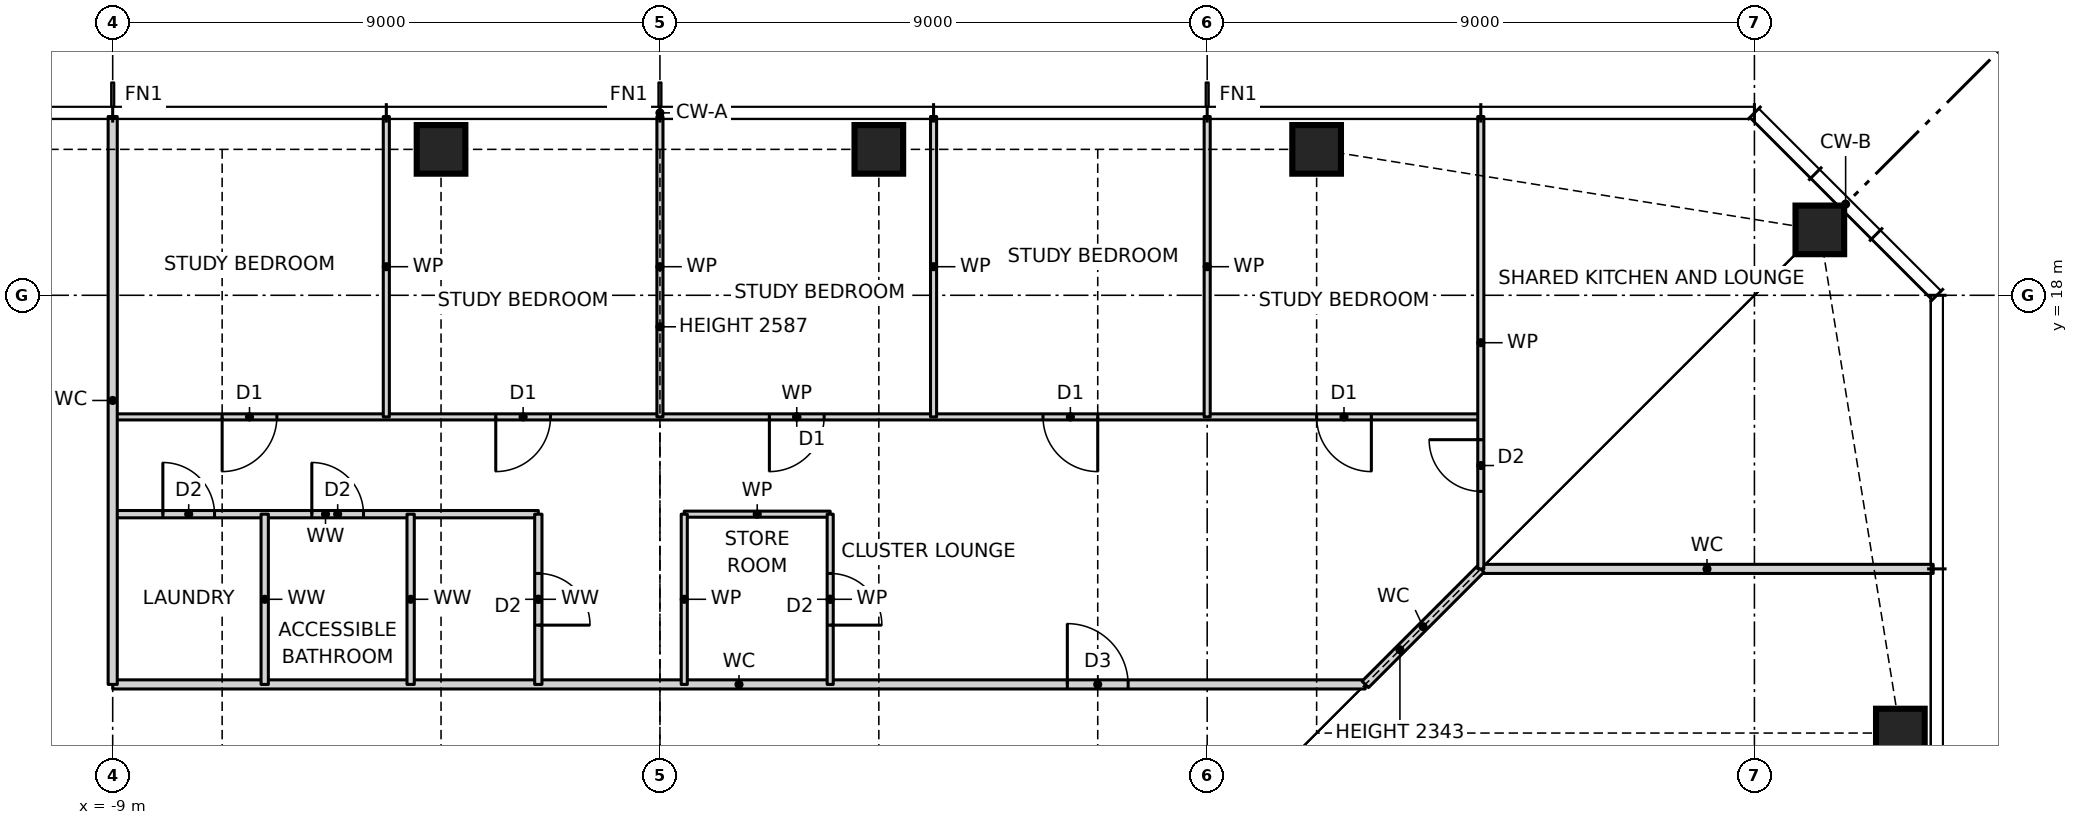
"""IFC4 building model, lengths in metres.
Left out: names, types, materials, properties, quantities, classifications, styles, units other than length and angle.
Written with IfcOpenShell. Run it as: python <this file> out.ifc"""

import sys

from ifc_helpers import new_model, si_unit, direction, frame, frame_2d, origin, origin_2d, place, context, subcontext, project, spatial, rectangle, hollow_rectangle, extrude, element, fill, save


model = new_model("IFC4")
c1 = context("Model", 3, precision=1e-05, world=origin(), true_north=direction((0.0, 1.0)))
c2 = subcontext(c1, "Body", "Model", "MODEL_VIEW")
j1 = project(units=[si_unit("LENGTHUNIT", "METRE"), si_unit("PLANEANGLEUNIT", "RADIAN")], contexts=[c1])
p1 = place(None, origin())
s1 = spatial("IfcSite", under=j1, at=p1, CompositionType="ELEMENT")
p2 = place(p1, origin())
s2 = spatial("IfcBuilding", under=s1, at=p2, CompositionType="ELEMENT")
p3 = place(p2, frame((0.0, 0.0, 87.5)))
s3 = spatial("IfcBuildingStorey", under=s2, at=p3, CompositionType="ELEMENT", Elevation=87.5)
for number, where, z_axis, x_axis in (
    (1, (20.4, 10.8, 0.0), (0.0, 0.0, 1.0), (1.0, 0.0, 0.0)),
    (2, (19.076, 19.076, 0.0), (0.0, 0.0, 1.0), (1.0, 0.0, 0.0)),
    (3, (10.8, 20.4, 0.0), (0.0, 0.0, 1.0), (1.0, 0.0, 0.0)),
    (4, (3.6, 20.4, 0.0), (0.0, 0.0, 1.0), (1.0, 0.0, 0.0)),
    (5, (-3.6, 20.4, 0.0), (0.0, 0.0, 1.0), (1.0, 0.0, 0.0)),
):
    element("IfcColumn", number, at=place(p3, frame(where, z_axis=z_axis, x_axis=x_axis)), inside=s3, PredefinedType="COLUMN", context=c2, shape_type="SweptSolid", body=[
        extrude(hollow_rectangle(XDim=0.8, YDim=0.8, WallThickness=0.07, at=origin_2d()), origin(), (0.0, 0.0, 1.0), 3.5),
    ])
p4 = place(p3, frame((-9.0, 11.6, 0.0), z_axis=(0.0, 0.0, 1.0), x_axis=(1.0, 0.0, 0.0)))
e6 = element("IfcWall", 6, at=p4, inside=s3, PredefinedType="PARTITIONING", context=c2, shape_type="SweptSolid", body=[
    extrude(rectangle(XDim=20.6, YDim=0.15, at=frame_2d((10.3, 0.0))), origin(), (0.0, 0.0, 1.0), 3.27),
])
p5 = place(p4, frame((15.7, 0.0, 0.0)))
e7 = element("IfcOpeningElement", 7, at=p5, cuts=e6, PredefinedType="OPENING", context=c2, shape_type="SweptSolid", body=[
    extrude(rectangle(XDim=1.0, YDim=2.1, at=frame_2d((0.5, 1.05))), frame((0.0, 0.085, 0.0), z_axis=(0.0, -1.0, 0.0), x_axis=(1.0, 0.0, 0.0)), (0.0, 0.0, 1.0), 0.17),
])
p6 = place(p3, frame((13.5, 13.5, 0.0), z_axis=(0.0, 0.0, 1.0), x_axis=(1.0, 0.0, 0.0)))
e8 = element("IfcWall", 8, at=p6, inside=s3, PredefinedType="PARTITIONING", context=c2, shape_type="SweptSolid", body=[
    extrude(rectangle(XDim=7.44, YDim=0.15, at=frame_2d((3.72, 0.0))), origin(), (0.0, 0.0, 1.0), 3.27),
])
p7 = place(p3, frame((-9.0, 14.4, 0.0), z_axis=(0.0, 0.0, 1.0), x_axis=(1.0, 0.0, 0.0)))
e9 = element("IfcWall", 9, at=p7, inside=s3, PredefinedType="PARTITIONING", context=c2, shape_type="SweptSolid", body=[
    extrude(rectangle(XDim=7.0, YDim=0.12, at=frame_2d((3.5, 0.0))), origin(), (0.0, 0.0, 1.0), 3.27),
])
p8 = place(p7, frame((3.275, 0.0, 0.0)))
e10 = element("IfcOpeningElement", 10, at=p8, cuts=e9, PredefinedType="OPENING", context=c2, shape_type="SweptSolid", body=[
    extrude(rectangle(XDim=0.85, YDim=2.1, at=frame_2d((0.425, 1.05))), frame((0.0, 0.07, 0.0), z_axis=(0.0, -1.0, 0.0), x_axis=(1.0, 0.0, 0.0)), (0.0, 0.0, 1.0), 0.14),
])
p9 = place(p7, frame((0.825, 0.0, 0.0)))
e11 = element("IfcOpeningElement", 11, at=p9, cuts=e9, PredefinedType="OPENING", context=c2, shape_type="SweptSolid", body=[
    extrude(rectangle(XDim=0.85, YDim=2.1, at=frame_2d((0.425, 1.05))), frame((0.0, 0.07, 0.0), z_axis=(0.0, -1.0, 0.0), x_axis=(1.0, 0.0, 0.0)), (0.0, 0.0, 1.0), 0.14),
])
p10 = place(p3, frame((0.4, 14.4, 0.0), z_axis=(0.0, 0.0, 1.0), x_axis=(1.0, 0.0, 0.0)))
e12 = element("IfcWall", 12, at=p10, inside=s3, PredefinedType="PARTITIONING", context=c2, shape_type="SweptSolid", body=[
    extrude(rectangle(XDim=2.4, YDim=0.1, at=frame_2d((1.2, 0.0))), origin(), (0.0, 0.0, 1.0), 3.27),
])
p11 = place(p3, frame((-9.0, 16.0, 0.0), z_axis=(0.0, 0.0, 1.0), x_axis=(1.0, 0.0, 0.0)))
e13 = element("IfcWall", 13, at=p11, inside=s3, PredefinedType="PARTITIONING", context=c2, shape_type="SweptSolid", body=[
    extrude(rectangle(XDim=22.5, YDim=0.1, at=frame_2d((11.25, 0.0))), origin(), (0.0, 0.0, 1.0), 3.27),
])
p12 = place(p11, frame((19.8, 0.0, 0.0)))
e14 = element("IfcOpeningElement", 14, at=p12, cuts=e13, PredefinedType="OPENING", context=c2, shape_type="SweptSolid", body=[
    extrude(rectangle(XDim=0.9, YDim=2.1, at=frame_2d((0.45, 1.05))), frame((0.0, 0.06, 0.0), z_axis=(0.0, -1.0, 0.0), x_axis=(1.0, 0.0, 0.0)), (0.0, 0.0, 1.0), 0.12),
])
p13 = place(p11, frame((15.3, 0.0, 0.0)))
e15 = element("IfcOpeningElement", 15, at=p13, cuts=e13, PredefinedType="OPENING", context=c2, shape_type="SweptSolid", body=[
    extrude(rectangle(XDim=0.9, YDim=2.1, at=frame_2d((0.45, 1.05))), frame((0.0, 0.06, 0.0), z_axis=(0.0, -1.0, 0.0), x_axis=(1.0, 0.0, 0.0)), (0.0, 0.0, 1.0), 0.12),
])
p14 = place(p11, frame((10.8, 0.0, 0.0)))
e16 = element("IfcOpeningElement", 16, at=p14, cuts=e13, PredefinedType="OPENING", context=c2, shape_type="SweptSolid", body=[
    extrude(rectangle(XDim=0.9, YDim=2.1, at=frame_2d((0.45, 1.05))), frame((0.0, 0.06, 0.0), z_axis=(0.0, -1.0, 0.0), x_axis=(1.0, 0.0, 0.0)), (0.0, 0.0, 1.0), 0.12),
])
p15 = place(p11, frame((6.3, 0.0, 0.0)))
e17 = element("IfcOpeningElement", 17, at=p15, cuts=e13, PredefinedType="OPENING", context=c2, shape_type="SweptSolid", body=[
    extrude(rectangle(XDim=0.9, YDim=2.1, at=frame_2d((0.45, 1.05))), frame((0.0, 0.06, 0.0), z_axis=(0.0, -1.0, 0.0), x_axis=(1.0, 0.0, 0.0)), (0.0, 0.0, 1.0), 0.12),
])
p16 = place(p11, frame((1.8, 0.0, 0.0)))
e18 = element("IfcOpeningElement", 18, at=p16, cuts=e13, PredefinedType="OPENING", context=c2, shape_type="SweptSolid", body=[
    extrude(rectangle(XDim=0.9, YDim=2.1, at=frame_2d((0.45, 1.05))), frame((0.0, 0.06, 0.0), z_axis=(0.0, -1.0, 0.0), x_axis=(1.0, 0.0, 0.0)), (0.0, 0.0, 1.0), 0.12),
])
p17 = place(p3, frame((11.6, 11.6, 0.0), z_axis=(0.0, 0.0, 1.0), x_axis=(0.707106781187, 0.707106781187, 0.0)))
e19 = element("IfcWall", 19, at=p17, inside=s3, PredefinedType="PARTITIONING", context=c2, shape_type="SweptSolid", body=[
    extrude(rectangle(XDim=2.687, YDim=0.15, at=frame_2d((1.343, 0.0))), origin(), (0.0, 0.0, 1.0), 2.343),
])
p18 = place(p3, frame((13.5, 13.5, 0.0), z_axis=(0.0, 0.0, 1.0), x_axis=(0.0, 1.0, 0.0)))
e20 = element("IfcWall", 20, at=p18, inside=s3, PredefinedType="PARTITIONING", context=c2, shape_type="SweptSolid", body=[
    extrude(rectangle(XDim=7.44, YDim=0.1, at=frame_2d((3.72, 0.0))), origin(), (0.0, 0.0, 1.0), 3.27),
])
p19 = place(p18, frame((1.275, 0.0, 0.0)))
e21 = element("IfcOpeningElement", 21, at=p19, cuts=e20, PredefinedType="OPENING", context=c2, shape_type="SweptSolid", body=[
    extrude(rectangle(XDim=0.85, YDim=2.1, at=frame_2d((0.425, 1.05))), frame((0.0, 0.06, 0.0), z_axis=(0.0, -1.0, 0.0), x_axis=(1.0, 0.0, 0.0)), (0.0, 0.0, 1.0), 0.12),
])
for number, where, z_axis, x_axis in (
    (22, (9.0, 16.0, 0.0), (0.0, 0.0, 1.0), (0.0, 1.0, 0.0)),
    (23, (4.5, 16.0, 0.0), (0.0, 0.0, 1.0), (0.0, 1.0, 0.0)),
):
    element("IfcWall", number, at=place(p3, frame(where, z_axis=z_axis, x_axis=x_axis)), inside=s3, PredefinedType="PARTITIONING", context=c2, shape_type="SweptSolid", body=[
        extrude(rectangle(XDim=4.94, YDim=0.1, at=frame_2d((2.47, 0.0))), origin(), (0.0, 0.0, 1.0), 3.27),
    ])
p20 = place(p3, frame((2.8, 11.6, 0.0), z_axis=(0.0, 0.0, 1.0), x_axis=(0.0, 1.0, 0.0)))
e24 = element("IfcWall", 24, at=p20, inside=s3, PredefinedType="PARTITIONING", context=c2, shape_type="SweptSolid", body=[
    extrude(rectangle(XDim=2.8, YDim=0.1, at=frame_2d((1.4, 0.0))), origin(), (0.0, 0.0, 1.0), 3.27),
])
p21 = place(p20, frame((0.975, 0.0, 0.0)))
e25 = element("IfcOpeningElement", 25, at=p21, cuts=e24, PredefinedType="OPENING", context=c2, shape_type="SweptSolid", body=[
    extrude(rectangle(XDim=0.85, YDim=2.1, at=frame_2d((0.425, 1.05))), frame((0.0, 0.06, 0.0), z_axis=(0.0, -1.0, 0.0), x_axis=(1.0, 0.0, 0.0)), (0.0, 0.0, 1.0), 0.12),
])
p22 = place(p3, frame((0.4, 11.6, 0.0), z_axis=(0.0, 0.0, 1.0), x_axis=(0.0, 1.0, 0.0)))
e26 = element("IfcWall", 26, at=p22, inside=s3, PredefinedType="PARTITIONING", context=c2, shape_type="SweptSolid", body=[
    extrude(rectangle(XDim=2.8, YDim=0.1, at=frame_2d((1.4, 0.0))), origin(), (0.0, 0.0, 1.0), 3.27),
])
p23 = place(p3, frame((0.0, 16.0, 0.0), z_axis=(0.0, 0.0, 1.0), x_axis=(0.0, 1.0, 0.0)))
e27 = element("IfcWall", 27, at=p23, inside=s3, PredefinedType="PARTITIONING", context=c2, shape_type="SweptSolid", body=[
    extrude(rectangle(XDim=4.94, YDim=0.1, at=frame_2d((2.47, 0.0))), origin(), (0.0, 0.0, 1.0), 2.587),
])
p24 = place(p3, frame((-2.0, 11.6, 0.0), z_axis=(0.0, 0.0, 1.0), x_axis=(0.0, 1.0, 0.0)))
e28 = element("IfcWall", 28, at=p24, inside=s3, PredefinedType="PARTITIONING", context=c2, shape_type="SweptSolid", body=[
    extrude(rectangle(XDim=2.8, YDim=0.12, at=frame_2d((1.4, 0.0))), origin(), (0.0, 0.0, 1.0), 3.27),
])
p25 = place(p24, frame((0.975, 0.0, 0.0)))
e29 = element("IfcOpeningElement", 29, at=p25, cuts=e28, PredefinedType="OPENING", context=c2, shape_type="SweptSolid", body=[
    extrude(rectangle(XDim=0.85, YDim=2.1, at=frame_2d((0.425, 1.05))), frame((0.0, 0.07, 0.0), z_axis=(0.0, -1.0, 0.0), x_axis=(1.0, 0.0, 0.0)), (0.0, 0.0, 1.0), 0.14),
])
p26 = place(p3, frame((-4.1, 11.6, 0.0), z_axis=(0.0, 0.0, 1.0), x_axis=(0.0, 1.0, 0.0)))
e30 = element("IfcWall", 30, at=p26, inside=s3, PredefinedType="PARTITIONING", context=c2, shape_type="SweptSolid", body=[
    extrude(rectangle(XDim=2.8, YDim=0.12, at=frame_2d((1.4, 0.0))), origin(), (0.0, 0.0, 1.0), 3.27),
])
p27 = place(p3, frame((-4.5, 16.0, 0.0), z_axis=(0.0, 0.0, 1.0), x_axis=(0.0, 1.0, 0.0)))
e31 = element("IfcWall", 31, at=p27, inside=s3, PredefinedType="PARTITIONING", context=c2, shape_type="SweptSolid", body=[
    extrude(rectangle(XDim=4.94, YDim=0.1, at=frame_2d((2.47, 0.0))), origin(), (0.0, 0.0, 1.0), 3.27),
])
p28 = place(p3, frame((-6.5, 11.6, 0.0), z_axis=(0.0, 0.0, 1.0), x_axis=(0.0, 1.0, 0.0)))
e32 = element("IfcWall", 32, at=p28, inside=s3, PredefinedType="PARTITIONING", context=c2, shape_type="SweptSolid", body=[
    extrude(rectangle(XDim=2.8, YDim=0.12, at=frame_2d((1.4, 0.0))), origin(), (0.0, 0.0, 1.0), 3.27),
])
p29 = place(p3, frame((-9.0, 11.6, 0.0), z_axis=(0.0, 0.0, 1.0), x_axis=(0.0, 1.0, 0.0)))
e33 = element("IfcWall", 33, at=p29, inside=s3, PredefinedType="PARTITIONING", context=c2, shape_type="SweptSolid", body=[
    extrude(rectangle(XDim=9.34, YDim=0.15, at=frame_2d((4.67, 0.0))), origin(), (0.0, 0.0, 1.0), 3.27),
])
p30 = place(p12, frame((0.9, 0.0, 0.0), z_axis=(0.0, 0.0, 1.0), x_axis=(-1.0, 0.0, 0.0)))
e34 = element("IfcDoor", 34, at=p30, inside=s3, OperationType="SINGLE_SWING_LEFT", PredefinedType="DOOR", context=c2, shape_type="SweptSolid", body=[
    extrude(rectangle(XDim=0.9, YDim=2.1, at=frame_2d((0.45, 1.05))), frame((0.0, 0.025, 0.0), z_axis=(0.0, -1.0, 0.0), x_axis=(1.0, 0.0, 0.0)), (0.0, 0.0, 1.0), 0.05),
])
fill(e14, e34)
p31 = place(p13, frame((0.9, 0.0, 0.0), z_axis=(0.0, 0.0, 1.0), x_axis=(-1.0, 0.0, 0.0)))
e35 = element("IfcDoor", 35, at=p31, inside=s3, OperationType="SINGLE_SWING_LEFT", PredefinedType="DOOR", context=c2, shape_type="SweptSolid", body=[
    extrude(rectangle(XDim=0.9, YDim=2.1, at=frame_2d((0.45, 1.05))), frame((0.0, 0.025, 0.0), z_axis=(0.0, -1.0, 0.0), x_axis=(1.0, 0.0, 0.0)), (0.0, 0.0, 1.0), 0.05),
])
fill(e15, e35)
p32 = place(p14, frame((0.9, 0.0, 0.0), z_axis=(0.0, 0.0, 1.0), x_axis=(-1.0, 0.0, 0.0)))
e36 = element("IfcDoor", 36, at=p32, inside=s3, OperationType="SINGLE_SWING_RIGHT", PredefinedType="DOOR", context=c2, shape_type="SweptSolid", body=[
    extrude(rectangle(XDim=0.9, YDim=2.1, at=frame_2d((0.45, 1.05))), frame((0.0, 0.025, 0.0), z_axis=(0.0, -1.0, 0.0), x_axis=(1.0, 0.0, 0.0)), (0.0, 0.0, 1.0), 0.05),
])
fill(e16, e36)
p33 = place(p15, frame((0.9, 0.0, 0.0), z_axis=(0.0, 0.0, 1.0), x_axis=(-1.0, 0.0, 0.0)))
e37 = element("IfcDoor", 37, at=p33, inside=s3, OperationType="SINGLE_SWING_RIGHT", PredefinedType="DOOR", context=c2, shape_type="SweptSolid", body=[
    extrude(rectangle(XDim=0.9, YDim=2.1, at=frame_2d((0.45, 1.05))), frame((0.0, 0.025, 0.0), z_axis=(0.0, -1.0, 0.0), x_axis=(1.0, 0.0, 0.0)), (0.0, 0.0, 1.0), 0.05),
])
fill(e17, e37)
p34 = place(p16, frame((0.9, 0.0, 0.0), z_axis=(0.0, 0.0, 1.0), x_axis=(-1.0, 0.0, 0.0)))
e38 = element("IfcDoor", 38, at=p34, inside=s3, OperationType="SINGLE_SWING_RIGHT", PredefinedType="DOOR", context=c2, shape_type="SweptSolid", body=[
    extrude(rectangle(XDim=0.9, YDim=2.1, at=frame_2d((0.45, 1.05))), frame((0.0, 0.025, 0.0), z_axis=(0.0, -1.0, 0.0), x_axis=(1.0, 0.0, 0.0)), (0.0, 0.0, 1.0), 0.05),
])
fill(e18, e38)
p35 = place(p5, origin())
e39 = element("IfcDoor", 39, at=p35, inside=s3, OperationType="SINGLE_SWING_LEFT", PredefinedType="DOOR", context=c2, shape_type="SweptSolid", body=[
    extrude(rectangle(XDim=1.0, YDim=2.1, at=frame_2d((0.5, 1.05))), frame((0.0, 0.025, 0.0), z_axis=(0.0, -1.0, 0.0), x_axis=(1.0, 0.0, 0.0)), (0.0, 0.0, 1.0), 0.05),
])
fill(e7, e39)
p36 = place(p21, frame((0.85, 0.0, 0.0), z_axis=(0.0, 0.0, 1.0), x_axis=(-1.0, 0.0, 0.0)))
e40 = element("IfcDoor", 40, at=p36, inside=s3, OperationType="SINGLE_SWING_RIGHT", PredefinedType="DOOR", context=c2, shape_type="SweptSolid", body=[
    extrude(rectangle(XDim=0.85, YDim=2.1, at=frame_2d((0.425, 1.05))), frame((0.0, 0.025, 0.0), z_axis=(0.0, -1.0, 0.0), x_axis=(1.0, 0.0, 0.0)), (0.0, 0.0, 1.0), 0.05),
])
fill(e25, e40)
p37 = place(p25, frame((0.85, 0.0, 0.0), z_axis=(0.0, 0.0, 1.0), x_axis=(-1.0, 0.0, 0.0)))
e41 = element("IfcDoor", 41, at=p37, inside=s3, OperationType="SINGLE_SWING_RIGHT", PredefinedType="DOOR", context=c2, shape_type="SweptSolid", body=[
    extrude(rectangle(XDim=0.85, YDim=2.1, at=frame_2d((0.425, 1.05))), frame((0.0, 0.025, 0.0), z_axis=(0.0, -1.0, 0.0), x_axis=(1.0, 0.0, 0.0)), (0.0, 0.0, 1.0), 0.05),
])
fill(e29, e41)
p38 = place(p8, origin())
e42 = element("IfcDoor", 42, at=p38, inside=s3, OperationType="SINGLE_SWING_LEFT", PredefinedType="DOOR", context=c2, shape_type="SweptSolid", body=[
    extrude(rectangle(XDim=0.85, YDim=2.1, at=frame_2d((0.425, 1.05))), frame((0.0, 0.025, 0.0), z_axis=(0.0, -1.0, 0.0), x_axis=(1.0, 0.0, 0.0)), (0.0, 0.0, 1.0), 0.05),
])
fill(e10, e42)
p39 = place(p9, origin())
e43 = element("IfcDoor", 43, at=p39, inside=s3, OperationType="SINGLE_SWING_LEFT", PredefinedType="DOOR", context=c2, shape_type="SweptSolid", body=[
    extrude(rectangle(XDim=0.85, YDim=2.1, at=frame_2d((0.425, 1.05))), frame((0.0, 0.025, 0.0), z_axis=(0.0, -1.0, 0.0), x_axis=(1.0, 0.0, 0.0)), (0.0, 0.0, 1.0), 0.05),
])
fill(e11, e43)
p40 = place(p19, origin())
e44 = element("IfcDoor", 44, at=p40, inside=s3, OperationType="SINGLE_SWING_RIGHT", PredefinedType="DOOR", context=c2, shape_type="SweptSolid", body=[
    extrude(rectangle(XDim=0.85, YDim=2.1, at=frame_2d((0.425, 1.05))), frame((0.0, 0.025, 0.0), z_axis=(0.0, -1.0, 0.0), x_axis=(1.0, 0.0, 0.0)), (0.0, 0.0, 1.0), 0.05),
])
fill(e21, e44)
save(model, sys.argv[1])
